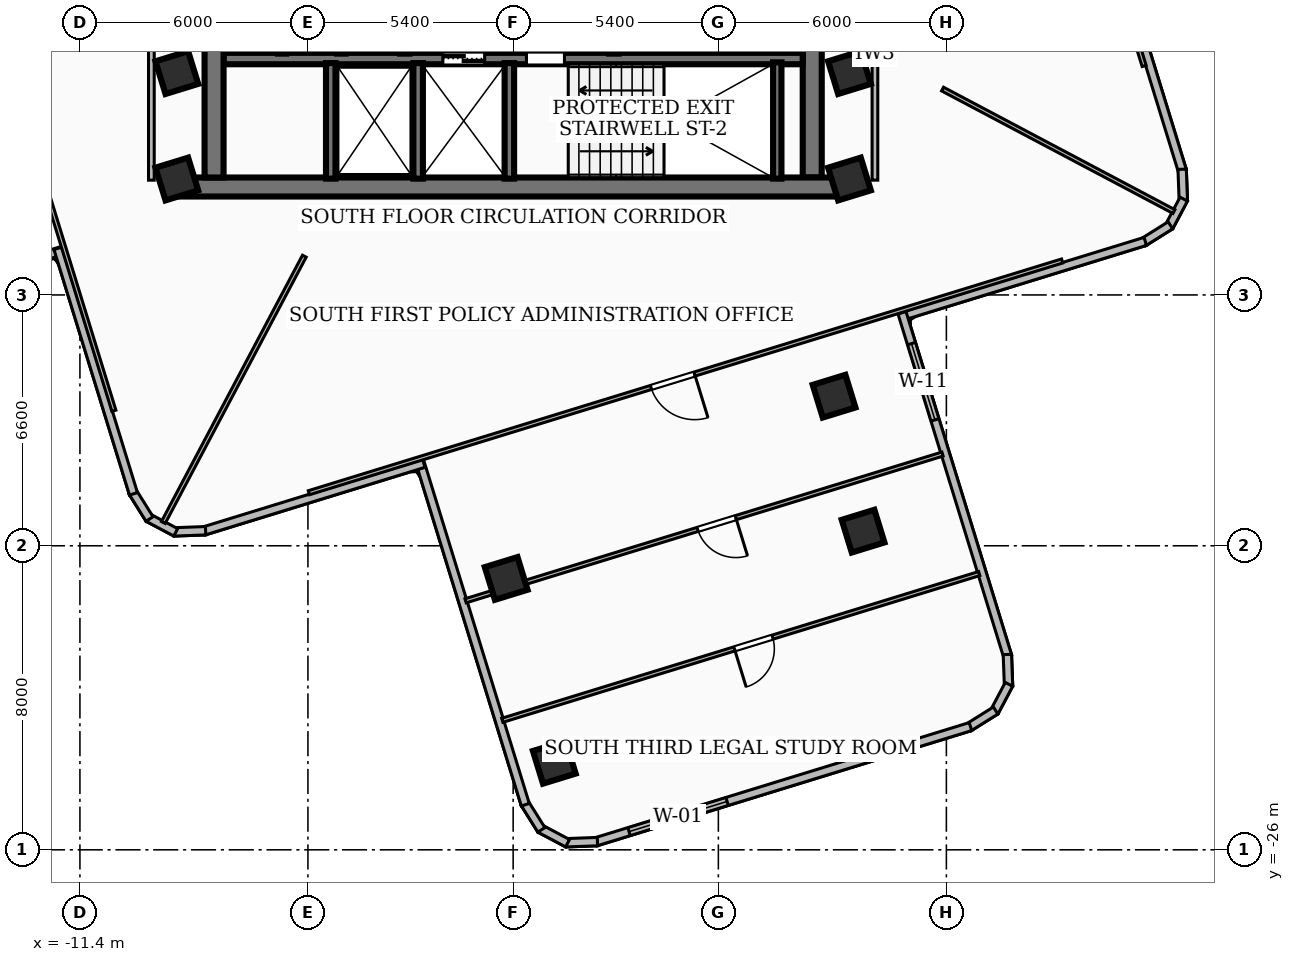
"""IFC4 building model, lengths in metres.
Left out: names, types, materials, properties, quantities, classifications, styles, units other than length and angle.
Written with IfcOpenShell. Run it as: python <this file> out.ifc"""

import sys

from ifc_helpers import new_model, si_unit, direction, frame, frame_2d, origin, origin_2d, place, context, subcontext, project, spatial, rectangle, extrude, element, fill, save


model = new_model("IFC4")
c1 = context("Model", 3, precision=1e-05, world=origin(), true_north=direction((0.0, 1.0)))
c2 = subcontext(c1, "Body", "Model", "MODEL_VIEW")
j1 = project(units=[si_unit("LENGTHUNIT", "METRE"), si_unit("PLANEANGLEUNIT", "RADIAN")], contexts=[c1])
p1 = place(None, origin())
s1 = spatial("IfcSite", under=j1, at=p1, CompositionType="ELEMENT")
p2 = place(p1, origin())
s2 = spatial("IfcBuilding", under=s1, at=p2, CompositionType="ELEMENT")
p3 = place(p2, frame((0.0, 0.0, 148.68)))
s3 = spatial("IfcBuildingStorey", under=s2, at=p3, CompositionType="ELEMENT", Elevation=148.68)
p4 = place(p3, frame((8.78, -8.56, 0.0), z_axis=(0.0, 0.0, 1.0), x_axis=(-1.0, 0.0, 0.0)))
e1 = element("IfcWall", 1, at=p4, inside=s3, PredefinedType="SHEAR", context=c2, shape_type="SweptSolid", body=[
    extrude(rectangle(XDim=17.56, YDim=0.5, at=frame_2d((8.78, 0.0))), origin(), (0.0, 0.0, 1.0), 3.32),
])
for number, where, z_axis, x_axis in (
    (2, (-7.87, -8.31, 0.0), (0.0, 0.0, 1.0), (0.0, 1.0, 0.0)),
    (3, (7.87, -2.0, 0.0), (0.0, 0.0, 1.0), (0.0, -1.0, 0.0)),
):
    element("IfcWall", number, at=place(p3, frame(where, z_axis=z_axis, x_axis=x_axis)), inside=s3, PredefinedType="SHEAR", context=c2, shape_type="SweptSolid", body=[
        extrude(rectangle(XDim=6.31, YDim=0.5, at=frame_2d((3.155, 0.0))), origin(), (0.0, 0.0, 1.0), 3.32),
    ])
p5 = place(p3, frame((-7.62, -5.18, 0.0), z_axis=(0.0, 0.0, 1.0), x_axis=(1.0, 0.0, 0.0)))
e4 = element("IfcWall", 4, at=p5, inside=s3, PredefinedType="SOLIDWALL", context=c2, shape_type="SweptSolid", body=[
    extrude(rectangle(XDim=15.24, YDim=0.3, at=frame_2d((7.62, 0.0))), origin(), (0.0, 0.0, 1.0), 3.32),
])
p6 = place(p5, frame((5.77, 0.0, 0.0)))
e5 = element("IfcOpeningElement", 5, at=p6, cuts=e4, PredefinedType="OPENING", context=c2, shape_type="SweptSolid", body=[
    extrude(rectangle(XDim=1.1, YDim=2.15, at=frame_2d((0.55, 1.075))), frame((0.0, 0.16, 0.0), z_axis=(0.0, -1.0, 0.0), x_axis=(1.0, 0.0, 0.0)), (0.0, 0.0, 1.0), 0.32),
])
p7 = place(p5, frame((7.97, 0.0, 0.0)))
e6 = element("IfcOpeningElement", 6, at=p7, cuts=e4, PredefinedType="OPENING", context=c2, shape_type="SweptSolid", body=[
    extrude(rectangle(XDim=1.0, YDim=2.1, at=frame_2d((0.5, 1.05))), frame((0.0, 0.16, 0.0), z_axis=(0.0, -1.0, 0.0), x_axis=(1.0, 0.0, 0.0)), (0.0, 0.0, 1.0), 0.32),
])
p8 = place(p3, frame((6.95, -8.34, 0.0), z_axis=(0.0, 0.0, 1.0), x_axis=(0.0, 1.0, 0.0)))
e7 = element("IfcWall", 7, at=p8, inside=s3, PredefinedType="SOLIDWALL", context=c2, shape_type="SweptSolid", body=[
    extrude(rectangle(XDim=3.06, YDim=0.22, at=frame_2d((1.53, 0.0))), origin(), (0.0, 0.0, 1.0), 3.32),
])
for number, where, z_axis, x_axis in (
    (8, (-0.1, -8.34, 0.0), (0.0, 0.0, 1.0), (0.0, 1.0, 0.0)),
    (9, (-2.5, -8.34, 0.0), (0.0, 0.0, 1.0), (0.0, 1.0, 0.0)),
    (10, (-4.8, -8.34, 0.0), (0.0, 0.0, 1.0), (0.0, 1.0, 0.0)),
):
    element("IfcWall", number, at=place(p3, frame(where, z_axis=z_axis, x_axis=x_axis)), inside=s3, PredefinedType="SOLIDWALL", context=c2, shape_type="SweptSolid", body=[
        extrude(rectangle(XDim=3.04, YDim=0.25, at=frame_2d((1.52, 0.0))), origin(), (0.0, 0.0, 1.0), 3.32),
    ])
for number, where, z_axis, x_axis in (
    (11, (-2.85, -5.05, 0.0), (0.0, 0.0, 1.0), (0.0, 1.0, 0.0)),
    (12, (2.65, -5.05, 0.0), (0.0, 0.0, 1.0), (0.0, 1.0, 0.0)),
):
    element("IfcWall", number, at=place(p3, frame(where, z_axis=z_axis, x_axis=x_axis)), inside=s3, PredefinedType="SOLIDWALL", context=c2, shape_type="SweptSolid", body=[
        extrude(rectangle(XDim=3.07, YDim=0.25, at=frame_2d((1.535, 0.0))), origin(), (0.0, 0.0, 1.0), 3.32),
    ])
for number, where, z_axis, x_axis in (
    (13, (-6.08, -5.05, 0.0), (0.0, 0.0, 1.0), (0.0, 1.0, 0.0)),
    (14, (-4.52, -5.05, 0.0), (0.0, 0.0, 1.0), (0.0, 1.0, 0.0)),
):
    element("IfcWall", number, at=place(p3, frame(where, z_axis=z_axis, x_axis=x_axis)), inside=s3, PredefinedType="SOLIDWALL", context=c2, shape_type="SweptSolid", body=[
        extrude(rectangle(XDim=3.07, YDim=0.22, at=frame_2d((1.535, 0.0))), origin(), (0.0, 0.0, 1.0), 3.32),
    ])
for number, where, z_axis, x_axis in (
    (15, (-8.85, -5.55, 0.0), (0.0, 0.0, 1.0), (0.956, 0.294, 0.0)),
    (16, (8.85, -5.55, 0.0), (0.0, 0.0, 1.0), (0.956, 0.294, 0.0)),
    (17, (8.85, -8.35, 0.0), (0.0, 0.0, 1.0), (0.956, 0.294, 0.0)),
    (18, (-8.85, -8.35, 0.0), (0.0, 0.0, 1.0), (0.956, 0.294, 0.0)),
    (19, (-0.183, -18.86, 0.0), (0.0, 0.0, 1.0), (0.956, 0.294, 0.0)),
    (20, (8.445, -14.064, 0.0), (0.0, 0.0, 1.0), (0.956, 0.294, 0.0)),
    (21, (1.083, -23.697, 0.0), (0.0, 0.0, 1.0), (0.956, 0.294, 0.0)),
    (22, (9.208, -17.615, 0.0), (0.0, 0.0, 1.0), (0.956, 0.294, 0.0)),
):
    element("IfcColumn", number, at=place(p3, frame(where, z_axis=z_axis, x_axis=x_axis)), inside=s3, PredefinedType="COLUMN", context=c2, shape_type="SweptSolid", body=[
        extrude(rectangle(XDim=0.9, YDim=0.9, at=origin_2d()), origin(), (0.0, 0.0, 1.0), 3.6),
    ])
p9 = place(p3, frame((-11.868, -10.232, 0.0), z_axis=(0.0, 0.0, 1.0), x_axis=(-0.955802538335, -0.29400936671, 0.0)))
e23 = element("IfcWall", 23, at=p9, inside=s3, PredefinedType="SOLIDWALL", context=c2, shape_type="SweptSolid", body=[
    extrude(rectangle(XDim=13.459, YDim=0.22, at=frame_2d((6.729, 0.0))), origin(), (0.0, 0.0, 1.0), 3.32),
])
p10 = place(p9, frame((2.85, 0.0, 0.85)))
e24 = element("IfcOpeningElement", 24, at=p10, cuts=e23, PredefinedType="OPENING", context=c2, shape_type="SweptSolid", body=[
    extrude(rectangle(XDim=1.5, YDim=1.8, at=frame_2d((0.75, 0.9))), frame((0.0, 0.12, 0.0), z_axis=(0.0, -1.0, 0.0), x_axis=(1.0, 0.0, 0.0)), (0.0, 0.0, 1.0), 0.24),
])
p11 = place(p3, frame((15.831, -2.351, 0.0), z_axis=(0.0, 0.0, 1.0), x_axis=(0.293958424126, -0.955818207028, 0.0)))
e25 = element("IfcWall", 25, at=p11, inside=s3, PredefinedType="SOLIDWALL", context=c2, shape_type="SweptSolid", body=[
    extrude(rectangle(XDim=6.059, YDim=0.22, at=frame_2d((3.029, 0.0))), origin(), (0.0, 0.0, 1.0), 3.32),
])
p12 = place(p3, frame((17.604, -8.093, 0.0), z_axis=(0.0, 0.0, 1.0), x_axis=(0.037195813461, -0.999307996296, 0.0)))
e26 = element("IfcWall", 26, at=p12, inside=s3, PredefinedType="SOLIDWALL", context=c2, shape_type="SweptSolid", body=[
    extrude(rectangle(XDim=0.833, YDim=0.22, at=frame_2d((0.417, 0.0))), origin(), (0.0, 0.0, 1.0), 3.32),
])
p13 = place(p3, frame((17.646, -8.879, 0.0), z_axis=(0.0, 0.0, 1.0), x_axis=(-0.46853080902, -0.883447158012, 0.0)))
e27 = element("IfcWall", 27, at=p13, inside=s3, PredefinedType="SOLIDWALL", context=c2, shape_type="SweptSolid", body=[
    extrude(rectangle(XDim=0.82, YDim=0.22, at=frame_2d((0.41, 0.0))), origin(), (0.0, 0.0, 1.0), 3.32),
])
p14 = place(p3, frame((17.295, -9.568, 0.0), z_axis=(0.0, 0.0, 1.0), x_axis=(-0.847058721529, -0.531499315411, 0.0)))
e28 = element("IfcWall", 28, at=p14, inside=s3, PredefinedType="SOLIDWALL", context=c2, shape_type="SweptSolid", body=[
    extrude(rectangle(XDim=0.833, YDim=0.22, at=frame_2d((0.417, 0.0))), origin(), (0.0, 0.0, 1.0), 3.32),
])
p15 = place(p3, frame((16.634, -9.991, 0.0), z_axis=(0.0, 0.0, 1.0), x_axis=(-0.955804779036, -0.294002082259, 0.0)))
e29 = element("IfcWall", 29, at=p15, inside=s3, PredefinedType="SOLIDWALL", context=c2, shape_type="SweptSolid", body=[
    extrude(rectangle(XDim=6.759, YDim=0.22, at=frame_2d((3.379, 0.0))), origin(), (0.0, 0.0, 1.0), 3.32),
])
p16 = place(p3, frame((10.232, -11.868, 0.0), z_axis=(0.0, 0.0, 1.0), x_axis=(0.29400423166, -0.955804117885, 0.0)))
e30 = element("IfcWall", 30, at=p16, inside=s3, PredefinedType="SOLIDWALL", context=c2, shape_type="SweptSolid", body=[
    extrude(rectangle(XDim=9.459, YDim=0.22, at=frame_2d((4.729, 0.0))), origin(), (0.0, 0.0, 1.0), 3.32),
])
p17 = place(p16, frame((0.85, 0.0, 0.85)))
e31 = element("IfcOpeningElement", 31, at=p17, cuts=e30, PredefinedType="OPENING", context=c2, shape_type="SweptSolid", body=[
    extrude(rectangle(XDim=2.1, YDim=1.6, at=frame_2d((1.05, 0.8))), frame((0.0, 0.12, 0.0), z_axis=(0.0, -1.0, 0.0), x_axis=(1.0, 0.0, 0.0)), (0.0, 0.0, 1.0), 0.24),
])
p18 = place(p3, frame((13.005, -20.86, 0.0), z_axis=(0.0, 0.0, 1.0), x_axis=(0.037195813461, -0.999307996296, 0.0)))
e32 = element("IfcWall", 32, at=p18, inside=s3, PredefinedType="SOLIDWALL", context=c2, shape_type="SweptSolid", body=[
    extrude(rectangle(XDim=0.833, YDim=0.22, at=frame_2d((0.417, 0.0))), origin(), (0.0, 0.0, 1.0), 3.32),
])
p19 = place(p3, frame((13.047, -21.646, 0.0), z_axis=(0.0, 0.0, 1.0), x_axis=(-0.46853080902, -0.883447158012, 0.0)))
e33 = element("IfcWall", 33, at=p19, inside=s3, PredefinedType="SOLIDWALL", context=c2, shape_type="SweptSolid", body=[
    extrude(rectangle(XDim=0.82, YDim=0.22, at=frame_2d((0.41, 0.0))), origin(), (0.0, 0.0, 1.0), 3.32),
])
p20 = place(p3, frame((12.696, -22.335, 0.0), z_axis=(0.0, 0.0, 1.0), x_axis=(-0.847340146221, -0.531050540535, 0.0)))
e34 = element("IfcWall", 34, at=p20, inside=s3, PredefinedType="SOLIDWALL", context=c2, shape_type="SweptSolid", body=[
    extrude(rectangle(XDim=0.834, YDim=0.22, at=frame_2d((0.417, 0.0))), origin(), (0.0, 0.0, 1.0), 3.32),
])
p21 = place(p3, frame((12.034, -22.758, 0.0), z_axis=(0.0, 0.0, 1.0), x_axis=(-0.955818382151, -0.293957854703, 0.0)))
e35 = element("IfcWall", 35, at=p21, inside=s3, PredefinedType="SOLIDWALL", context=c2, shape_type="SweptSolid", body=[
    extrude(rectangle(XDim=10.321, YDim=0.22, at=frame_2d((5.161, 0.0))), origin(), (0.0, 0.0, 1.0), 3.32),
])
p22 = place(p21, frame((6.7, 0.0, 0.85)))
e36 = element("IfcOpeningElement", 36, at=p22, cuts=e35, PredefinedType="OPENING", context=c2, shape_type="SweptSolid", body=[
    extrude(rectangle(XDim=2.7, YDim=2.1, at=frame_2d((1.35, 1.05))), frame((0.0, 0.12, 0.0), z_axis=(0.0, -1.0, 0.0), x_axis=(1.0, 0.0, 0.0)), (0.0, 0.0, 1.0), 0.24),
])
p23 = place(p3, frame((2.218, -25.784, 0.0), z_axis=(0.0, 0.0, 1.0), x_axis=(-0.999307996296, -0.037195813461, 0.0)))
e37 = element("IfcWall", 37, at=p23, inside=s3, PredefinedType="SOLIDWALL", context=c2, shape_type="SweptSolid", body=[
    extrude(rectangle(XDim=0.833, YDim=0.22, at=frame_2d((0.417, 0.0))), origin(), (0.0, 0.0, 1.0), 3.32),
])
p24 = place(p3, frame((1.432, -25.826, 0.0), z_axis=(0.0, 0.0, 1.0), x_axis=(-0.883381746049, 0.468654126993, 0.0)))
e38 = element("IfcWall", 38, at=p24, inside=s3, PredefinedType="SOLIDWALL", context=c2, shape_type="SweptSolid", body=[
    extrude(rectangle(XDim=0.819, YDim=0.22, at=frame_2d((0.41, 0.0))), origin(), (0.0, 0.0, 1.0), 3.32),
])
p25 = place(p3, frame((0.743, -25.475, 0.0), z_axis=(0.0, 0.0, 1.0), x_axis=(-0.530840416366, 0.847471800329, 0.0)))
e39 = element("IfcWall", 39, at=p25, inside=s3, PredefinedType="SOLIDWALL", context=c2, shape_type="SweptSolid", body=[
    extrude(rectangle(XDim=0.834, YDim=0.22, at=frame_2d((0.417, 0.0))), origin(), (0.0, 0.0, 1.0), 3.32),
])
p26 = place(p3, frame((0.32, -24.813, 0.0), z_axis=(0.0, 0.0, 1.0), x_axis=(-0.294033246156, 0.955795192578, 0.0)))
e40 = element("IfcWall", 40, at=p26, inside=s3, PredefinedType="SOLIDWALL", context=c2, shape_type="SweptSolid", body=[
    extrude(rectangle(XDim=9.458, YDim=0.22, at=frame_2d((4.729, 0.0))), origin(), (0.0, 0.0, 1.0), 2.55),
])
p27 = place(p3, frame((-2.351, -15.831, 0.0), z_axis=(0.0, 0.0, 1.0), x_axis=(-0.955818207028, -0.293958424126, 0.0)))
e41 = element("IfcWall", 41, at=p27, inside=s3, PredefinedType="SOLIDWALL", context=c2, shape_type="SweptSolid", body=[
    extrude(rectangle(XDim=6.059, YDim=0.22, at=frame_2d((3.029, 0.0))), origin(), (0.0, 0.0, 1.0), 2.55),
])
p28 = place(p3, frame((-8.093, -17.604, 0.0), z_axis=(0.0, 0.0, 1.0), x_axis=(-0.999307996296, -0.037195813461, 0.0)))
e42 = element("IfcWall", 42, at=p28, inside=s3, PredefinedType="SOLIDWALL", context=c2, shape_type="SweptSolid", body=[
    extrude(rectangle(XDim=0.833, YDim=0.22, at=frame_2d((0.417, 0.0))), origin(), (0.0, 0.0, 1.0), 3.32),
])
p29 = place(p3, frame((-8.879, -17.646, 0.0), z_axis=(0.0, 0.0, 1.0), x_axis=(-0.883447158012, 0.46853080902, 0.0)))
e43 = element("IfcWall", 43, at=p29, inside=s3, PredefinedType="SOLIDWALL", context=c2, shape_type="SweptSolid", body=[
    extrude(rectangle(XDim=0.82, YDim=0.22, at=frame_2d((0.41, 0.0))), origin(), (0.0, 0.0, 1.0), 3.32),
])
p30 = place(p3, frame((-9.568, -17.295, 0.0), z_axis=(0.0, 0.0, 1.0), x_axis=(-0.531499315411, 0.847058721529, 0.0)))
e44 = element("IfcWall", 44, at=p30, inside=s3, PredefinedType="SOLIDWALL", context=c2, shape_type="SweptSolid", body=[
    extrude(rectangle(XDim=0.833, YDim=0.22, at=frame_2d((0.417, 0.0))), origin(), (0.0, 0.0, 1.0), 3.32),
])
p31 = place(p3, frame((-9.991, -16.634, 0.0), z_axis=(0.0, 0.0, 1.0), x_axis=(-0.294002082259, 0.955804779036, 0.0)))
e45 = element("IfcWall", 45, at=p31, inside=s3, PredefinedType="SOLIDWALL", context=c2, shape_type="SweptSolid", body=[
    extrude(rectangle(XDim=6.759, YDim=0.22, at=frame_2d((3.379, 0.0))), origin(), (0.0, 0.0, 1.0), 3.32),
])
for number, where, z_axis, x_axis in (
    (46, (-9.52, -8.38, 0.0), (0.0, 0.0, 1.0), (0.0, 1.0, 0.0)),
    (47, (9.52, -8.38, 0.0), (0.0, 0.0, 1.0), (0.0, 1.0, 0.0)),
):
    element("IfcWall", number, at=place(p3, frame(where, z_axis=z_axis, x_axis=x_axis)), inside=s3, PredefinedType="PARTITIONING", context=c2, shape_type="SweptSolid", body=[
        extrude(rectangle(XDim=6.63, YDim=0.15, at=frame_2d((3.315, 0.0))), origin(), (0.0, 0.0, 1.0), 2.55),
    ])
p32 = place(p3, frame((-5.495, -10.38, 0.0), z_axis=(0.0, 0.0, 1.0), x_axis=(-0.467965518706, -0.883746724635, 0.0)))
e48 = element("IfcWall", 48, at=p32, inside=s3, PredefinedType="PARTITIONING", context=c2, shape_type="SweptSolid", body=[
    extrude(rectangle(XDim=7.93, YDim=0.11, at=frame_2d((3.965, 0.0))), origin(), (0.0, 0.0, 1.0), 2.55),
])
p33 = place(p3, frame((11.3, -5.983, 0.0), z_axis=(0.0, 0.0, 1.0), x_axis=(0.883779295194, -0.467904004457, 0.0)))
e49 = element("IfcWall", 49, at=p33, inside=s3, PredefinedType="PARTITIONING", context=c2, shape_type="SweptSolid", body=[
    extrude(rectangle(XDim=6.888, YDim=0.11, at=frame_2d((3.444, 0.0))), origin(), (0.0, 0.0, 1.0), 3.32),
])
p34 = place(p3, frame((10.506, 14.447, 0.0), z_axis=(0.0, 0.0, 1.0), x_axis=(0.294033732643, -0.955795042919, 0.0)))
e50 = element("IfcWall", 50, at=p34, inside=s3, PredefinedType="PARTITIONING", context=c2, shape_type="SweptSolid", body=[
    extrude(rectangle(XDim=20.739, YDim=0.11, at=frame_2d((10.369, 0.0))), origin(), (0.0, 0.0, 1.0), 2.55),
])
p35 = place(p34, frame((10.12, 0.0, 0.0)))
e51 = element("IfcOpeningElement", 51, at=p35, cuts=e50, PredefinedType="OPENING", context=c2, shape_type="SweptSolid", body=[
    extrude(rectangle(XDim=1.2, YDim=2.1, at=frame_2d((0.6, 1.05))), frame((0.0, 0.065, 0.0), z_axis=(0.0, -1.0, 0.0), x_axis=(1.0, 0.0, 0.0)), (0.0, 0.0, 1.0), 0.13),
])
p36 = place(p3, frame((-10.506, -14.447, 0.0), z_axis=(0.0, 0.0, 1.0), x_axis=(-0.294033732643, 0.955795042919, 0.0)))
e52 = element("IfcWall", 52, at=p36, inside=s3, PredefinedType="PARTITIONING", context=c2, shape_type="SweptSolid", body=[
    extrude(rectangle(XDim=20.739, YDim=0.11, at=frame_2d((10.369, 0.0))), origin(), (0.0, 0.0, 1.0), 2.55),
])
p37 = place(p36, frame((10.12, 0.0, 0.0)))
e53 = element("IfcOpeningElement", 53, at=p37, cuts=e52, PredefinedType="OPENING", context=c2, shape_type="SweptSolid", body=[
    extrude(rectangle(XDim=1.2, YDim=2.1, at=frame_2d((0.6, 1.05))), frame((0.0, 0.065, 0.0), z_axis=(0.0, -1.0, 0.0), x_axis=(1.0, 0.0, 0.0)), (0.0, 0.0, 1.0), 0.13),
])
p38 = place(p3, frame((14.447, -10.506, 0.0), z_axis=(0.0, 0.0, 1.0), x_axis=(-0.955795042919, -0.294033732643, 0.0)))
e54 = element("IfcWall", 54, at=p38, inside=s3, PredefinedType="PARTITIONING", context=c2, shape_type="SweptSolid", body=[
    extrude(rectangle(XDim=20.739, YDim=0.11, at=frame_2d((10.369, 0.0))), origin(), (0.0, 0.0, 1.0), 2.55),
])
p39 = place(p38, frame((10.12, 0.0, 0.0)))
e55 = element("IfcOpeningElement", 55, at=p39, cuts=e54, PredefinedType="OPENING", context=c2, shape_type="SweptSolid", body=[
    extrude(rectangle(XDim=1.2, YDim=2.1, at=frame_2d((0.6, 1.05))), frame((0.0, 0.065, 0.0), z_axis=(0.0, -1.0, 0.0), x_axis=(1.0, 0.0, 0.0)), (0.0, 0.0, 1.0), 0.13),
])
p40 = place(p3, frame((11.298, -15.587, 0.0), z_axis=(0.0, 0.0, 1.0), x_axis=(-0.955789058601, -0.294053184744, 0.0)))
e56 = element("IfcWall", 56, at=p40, inside=s3, PredefinedType="PARTITIONING", context=c2, shape_type="SweptSolid", body=[
    extrude(rectangle(XDim=13.131, YDim=0.11, at=frame_2d((6.565, 0.0))), origin(), (0.0, 0.0, 1.0), 2.55),
])
p41 = place(p40, frame((5.691, 0.0, 0.0)))
e57 = element("IfcOpeningElement", 57, at=p41, cuts=e56, PredefinedType="OPENING", context=c2, shape_type="SweptSolid", body=[
    extrude(rectangle(XDim=1.05, YDim=2.08, at=frame_2d((0.525, 1.04))), frame((0.0, 0.065, 0.0), z_axis=(0.0, -1.0, 0.0), x_axis=(1.0, 0.0, 0.0)), (0.0, 0.0, 1.0), 0.13),
])
p42 = place(p3, frame((12.265, -18.731, 0.0), z_axis=(0.0, 0.0, 1.0), x_axis=(-0.955787450846, -0.294058410535, 0.0)))
e58 = element("IfcWall", 58, at=p42, inside=s3, PredefinedType="PARTITIONING", context=c2, shape_type="SweptSolid", body=[
    extrude(rectangle(XDim=13.13, YDim=0.11, at=frame_2d((6.565, 0.0))), origin(), (0.0, 0.0, 1.0), 2.55),
])
p43 = place(p42, frame((5.69, 0.0, 0.0)))
e59 = element("IfcOpeningElement", 59, at=p43, cuts=e58, PredefinedType="OPENING", context=c2, shape_type="SweptSolid", body=[
    extrude(rectangle(XDim=1.05, YDim=2.08, at=frame_2d((0.525, 1.04))), frame((0.0, 0.065, 0.0), z_axis=(0.0, -1.0, 0.0), x_axis=(1.0, 0.0, 0.0)), (0.0, 0.0, 1.0), 0.13),
])
p44 = place(p17, origin())
e60 = element("IfcWindow", 60, at=p44, inside=s3, PartitioningType="SINGLE_PANEL", PredefinedType="WINDOW", context=c2, shape_type="SweptSolid", body=[
    extrude(rectangle(XDim=2.1, YDim=1.6, at=frame_2d((1.05, 0.8))), frame((0.0, 0.03, 0.0), z_axis=(0.0, -1.0, 0.0), x_axis=(1.0, 0.0, 0.0)), (0.0, 0.0, 1.0), 0.06),
])
fill(e31, e60)
p45 = place(p22, origin())
e61 = element("IfcWindow", 61, at=p45, inside=s3, PartitioningType="SINGLE_PANEL", PredefinedType="WINDOW", context=c2, shape_type="SweptSolid", body=[
    extrude(rectangle(XDim=2.7, YDim=2.1, at=frame_2d((1.35, 1.05))), frame((0.0, 0.03, 0.0), z_axis=(0.0, -1.0, 0.0), x_axis=(1.0, 0.0, 0.0)), (0.0, 0.0, 1.0), 0.06),
])
fill(e36, e61)
p46 = place(p6, origin())
e62 = element("IfcDoor", 62, at=p46, inside=s3, OperationType="DOUBLE_DOOR_SLIDING", PredefinedType="DOOR", context=c2, shape_type="SweptSolid", body=[
    extrude(rectangle(XDim=1.1, YDim=2.15, at=frame_2d((0.55, 1.075))), frame((0.0, 0.025, 0.0), z_axis=(0.0, -1.0, 0.0), x_axis=(1.0, 0.0, 0.0)), (0.0, 0.0, 1.0), 0.05),
])
fill(e5, e62)
p47 = place(p7, origin())
e63 = element("IfcDoor", 63, at=p47, inside=s3, OperationType="SINGLE_SWING_LEFT", PredefinedType="DOOR", context=c2, shape_type="SweptSolid", body=[
    extrude(rectangle(XDim=1.0, YDim=2.1, at=frame_2d((0.5, 1.05))), frame((0.0, 0.025, 0.0), z_axis=(0.0, -1.0, 0.0), x_axis=(1.0, 0.0, 0.0)), (0.0, 0.0, 1.0), 0.05),
])
fill(e6, e63)
p48 = place(p39, origin())
e64 = element("IfcDoor", 64, at=p48, inside=s3, OperationType="SINGLE_SWING_LEFT", PredefinedType="DOOR", context=c2, shape_type="SweptSolid", body=[
    extrude(rectangle(XDim=1.2, YDim=2.1, at=frame_2d((0.6, 1.05))), frame((0.0, 0.025, 0.0), z_axis=(0.0, -1.0, 0.0), x_axis=(1.0, 0.0, 0.0)), (0.0, 0.0, 1.0), 0.05),
])
fill(e55, e64)
p49 = place(p41, origin())
e65 = element("IfcDoor", 65, at=p49, inside=s3, OperationType="SINGLE_SWING_LEFT", PredefinedType="DOOR", context=c2, shape_type="SweptSolid", body=[
    extrude(rectangle(XDim=1.05, YDim=2.08, at=frame_2d((0.525, 1.04))), frame((0.0, 0.025, 0.0), z_axis=(0.0, -1.0, 0.0), x_axis=(1.0, 0.0, 0.0)), (0.0, 0.0, 1.0), 0.05),
])
fill(e57, e65)
p50 = place(p43, origin())
e66 = element("IfcDoor", 66, at=p50, inside=s3, OperationType="SINGLE_SWING_RIGHT", PredefinedType="DOOR", context=c2, shape_type="SweptSolid", body=[
    extrude(rectangle(XDim=1.05, YDim=2.08, at=frame_2d((0.525, 1.04))), frame((0.0, 0.025, 0.0), z_axis=(0.0, -1.0, 0.0), x_axis=(1.0, 0.0, 0.0)), (0.0, 0.0, 1.0), 0.05),
])
fill(e59, e66)
save(model, sys.argv[1])
